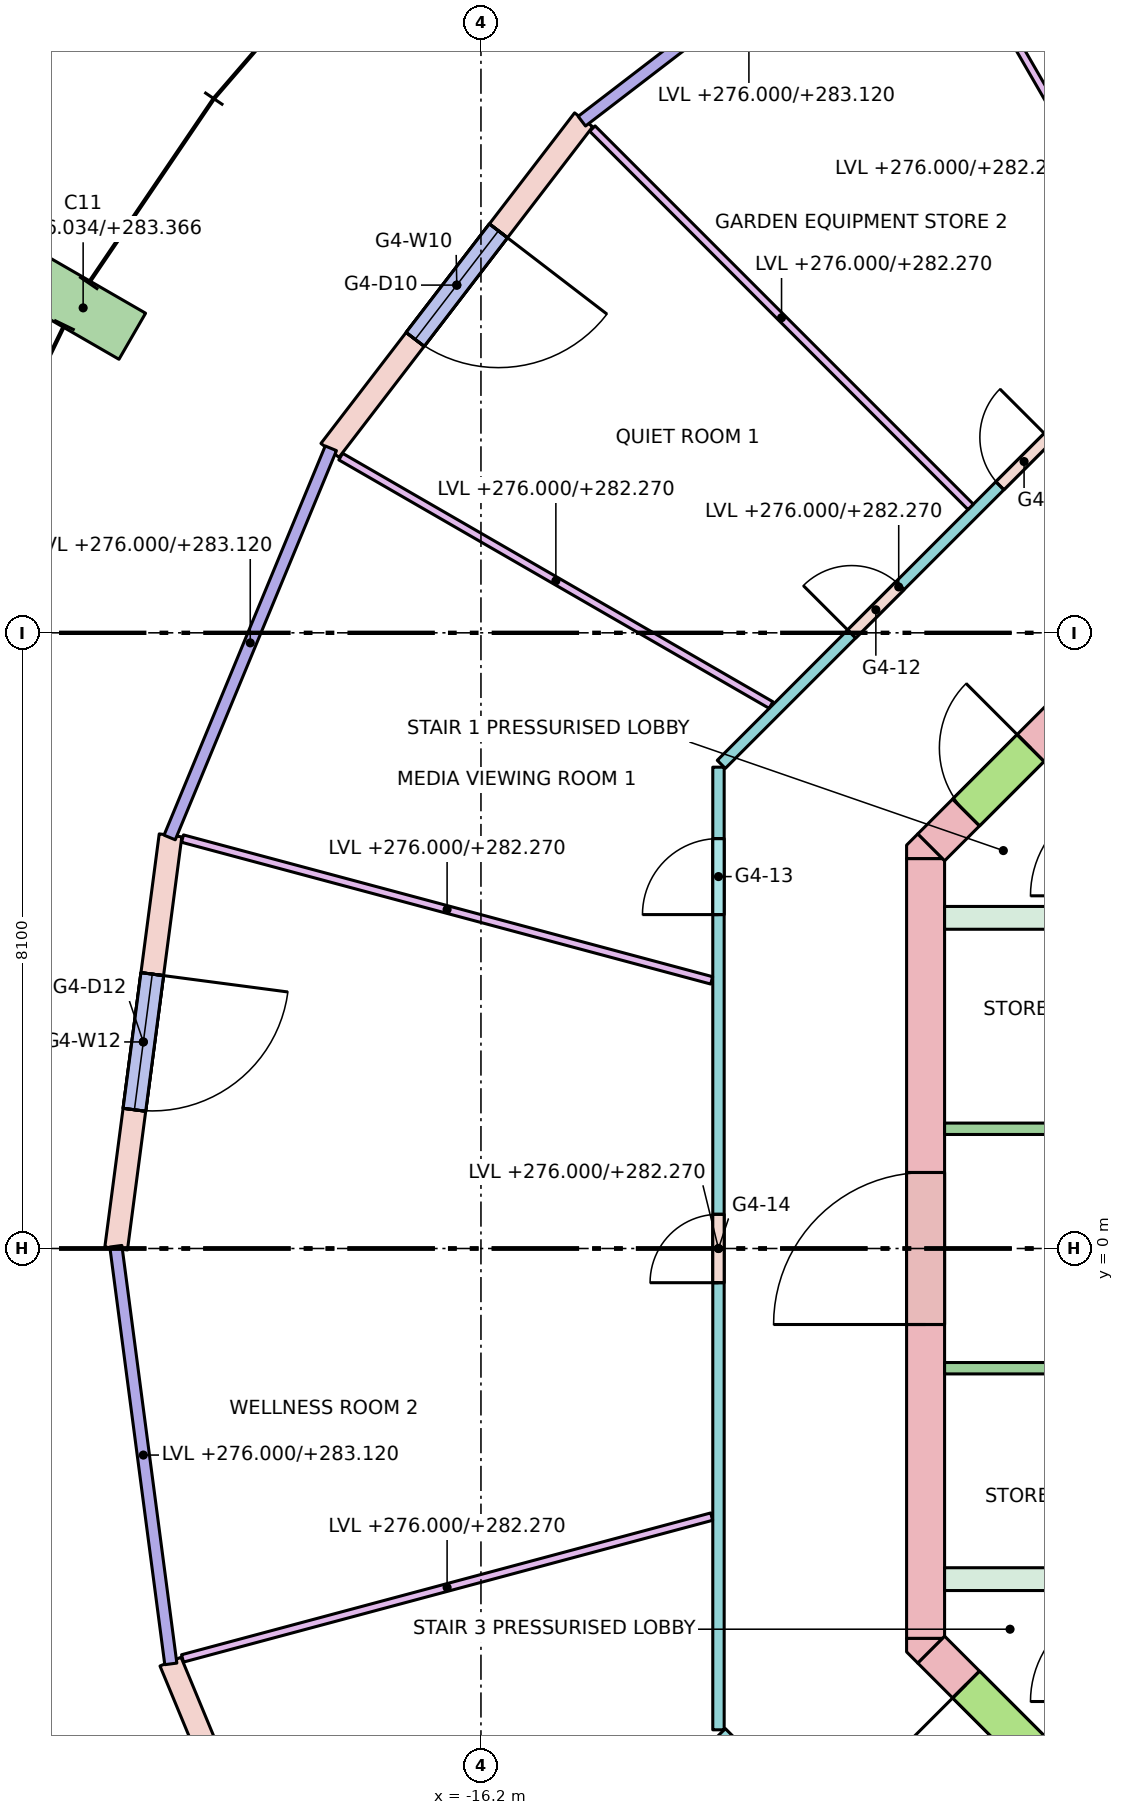
"""IFC4 building model, lengths in metres.
Left out: names, types, materials, properties, quantities, classifications, styles, units other than length and angle.
Written with IfcOpenShell. Run it as: python <this file> out.ifc"""

import sys

from ifc_helpers import new_model, si_unit, direction, frame, frame_2d, origin, origin_2d, place, context, subcontext, project, spatial, polyline, rectangle, outline, extrude, element, fill, save


model = new_model("IFC4")
c1 = context("Model", 3, precision=1e-05, world=origin(), true_north=direction((0.0, 1.0)))
c2 = subcontext(c1, "Body", "Model", "MODEL_VIEW")
j1 = project(units=[si_unit("LENGTHUNIT", "METRE"), si_unit("PLANEANGLEUNIT", "RADIAN")], contexts=[c1])
p1 = place(None, origin())
s1 = spatial("IfcSite", under=j1, at=p1, CompositionType="ELEMENT")
p2 = place(p1, origin())
s2 = spatial("IfcBuilding", under=s1, at=p2, CompositionType="ELEMENT")
p3 = place(p2, frame((0.0, 0.0, 276.0)))
s3 = spatial("IfcBuildingStorey", under=s2, at=p3, CompositionType="ELEMENT", Elevation=276.0)
p4 = place(p3, frame((-21.219, 12.251, 0.034), z_axis=(-0.058400484098, 0.033684920862, 0.997724766438), x_axis=(-0.4996371378, -0.866234801039, 0.0)))
e1 = element("IfcColumn", 1, at=p4, inside=s3, PredefinedType="COLUMN", context=c2, shape_type="SweptSolid", body=[
    extrude(rectangle(XDim=0.7, YDim=1.0, at=origin_2d()), origin(), (0.0, 0.0, 1.0), 7.349),
])
p5 = place(p3, frame((-10.35, -5.13, -0.28), z_axis=(0.0, 0.0, 1.0), x_axis=(0.0, 1.0, 0.0)))
e2 = element("IfcWall", 2, at=p5, inside=s3, PredefinedType="SHEAR", context=c2, shape_type="SweptSolid", body=[
    extrude(rectangle(XDim=10.26, YDim=0.5, at=frame_2d((5.13, 0.0))), origin(), (0.0, 0.0, 1.0), 7.4),
])
p6 = place(p5, frame((4.13, 0.0, 0.28)))
e3 = element("IfcOpeningElement", 3, at=p6, cuts=e2, PredefinedType="OPENING", context=c2, shape_type="SweptSolid", body=[
    extrude(rectangle(XDim=2.0, YDim=2.1, at=frame_2d((1.0, 1.05))), frame((0.0, 0.26, 0.0), z_axis=(0.0, -1.0, 0.0), x_axis=(1.0, 0.0, 0.0)), (0.0, 0.0, 1.0), 0.52),
])
p7 = place(p3, frame((-10.277, 5.277, -0.28), z_axis=(0.0, 0.0, 1.0), x_axis=(0.707106781187, 0.707106781187, 0.0)))
e4 = element("IfcWall", 4, at=p7, inside=s3, PredefinedType="SHEAR", context=c2, shape_type="SweptSolid", body=[
    extrude(rectangle(XDim=4.243, YDim=0.5, at=frame_2d((2.121, 0.0))), origin(), (0.0, 0.0, 1.0), 7.4),
])
p8 = place(p7, frame((0.65, 0.0, 0.28)))
e5 = element("IfcOpeningElement", 5, at=p8, cuts=e4, PredefinedType="OPENING", context=c2, shape_type="SweptSolid", body=[
    extrude(rectangle(XDim=1.2, YDim=2.1, at=frame_2d((0.6, 1.05))), frame((0.0, 0.26, 0.0), z_axis=(0.0, -1.0, 0.0), x_axis=(1.0, 0.0, 0.0)), (0.0, 0.0, 1.0), 0.52),
])
p9 = place(p3, frame((-7.277, -8.277, -0.28), z_axis=(0.0, 0.0, 1.0), x_axis=(-0.707106781187, 0.707106781187, 0.0)))
e6 = element("IfcWall", 6, at=p9, inside=s3, PredefinedType="SHEAR", context=c2, shape_type="SweptSolid", body=[
    extrude(rectangle(XDim=4.243, YDim=0.5, at=frame_2d((2.121, 0.0))), origin(), (0.0, 0.0, 1.0), 7.4),
])
p10 = place(p9, frame((2.393, 0.0, 0.28)))
e7 = element("IfcOpeningElement", 7, at=p10, cuts=e6, PredefinedType="OPENING", context=c2, shape_type="SweptSolid", body=[
    extrude(rectangle(XDim=1.2, YDim=2.1, at=frame_2d((0.6, 1.05))), frame((0.0, 0.26, 0.0), z_axis=(0.0, -1.0, 0.0), x_axis=(1.0, 0.0, 0.0)), (0.0, 0.0, 1.0), 0.52),
])
p11 = place(p3, frame((0.0, 0.0, -0.28)))
e8 = element("IfcWall", 8, at=p11, inside=s3, PredefinedType="SHEAR", context=c2, shape_type="SweptSolid", body=[
    extrude(outline(polyline([(-10.6, -5.307), (-10.6, -5.13), (-10.13, -5.13), (-10.454, -5.454), (-10.6, -5.307)])), origin(), (0.0, 0.0, 1.0), 7.4),
])
p12 = place(p3, frame((0.0, 0.0, -0.28)))
e9 = element("IfcWall", 9, at=p12, inside=s3, PredefinedType="SHEAR", context=c2, shape_type="SweptSolid", body=[
    extrude(outline(polyline([(-10.454, 5.454), (-10.13, 5.13), (-10.6, 5.13), (-10.6, 5.307), (-10.454, 5.454)])), origin(), (0.0, 0.0, 1.0), 7.4),
])
for number, where, z_axis, x_axis in (
    (10, (-10.1, 4.35, 0.0), (0.0, 0.0, 1.0), (1.0, 0.0, 0.0)),
    (11, (-10.1, -4.35, 0.0), (0.0, 0.0, 1.0), (1.0, 0.0, 0.0)),
):
    element("IfcWall", number, at=place(p3, frame(where, z_axis=z_axis, x_axis=x_axis)), inside=s3, PredefinedType="SOLIDWALL", context=c2, shape_type="SweptSolid", body=[
        extrude(rectangle(XDim=8.1, YDim=0.3, at=frame_2d((4.05, 0.0))), origin(), (0.0, 0.0, 1.0), 7.12),
    ])
p13 = place(p3, frame((-14.849, 14.849, 0.0), z_axis=(0.0, 0.0, 1.0), x_axis=(-0.608784891166, -0.793335336593, 0.0)))
e12 = element("IfcWall", 12, at=p13, inside=s3, PredefinedType="STANDARD", context=c2, shape_type="SweptSolid", body=[
    extrude(rectangle(XDim=5.482, YDim=0.3, at=frame_2d((2.741, 0.0))), origin(), (0.0, 0.0, 1.0), 7.12),
])
p14 = place(p13, frame((1.841, 0.0, 0.0)))
e13 = element("IfcOpeningElement", 13, at=p14, cuts=e12, PredefinedType="OPENING", context=c2, shape_type="SweptSolid", body=[
    extrude(rectangle(XDim=1.8, YDim=2.4, at=frame_2d((0.9, 1.2))), frame((0.0, 0.16, 0.0), z_axis=(0.0, -1.0, 0.0), x_axis=(1.0, 0.0, 0.0)), (0.0, 0.0, 1.0), 0.32),
])
p15 = place(p13, frame((1.841, 0.0, 2.8)))
e14 = element("IfcOpeningElement", 14, at=p15, cuts=e12, PredefinedType="OPENING", context=c2, shape_type="SweptSolid", body=[
    extrude(rectangle(XDim=1.8, YDim=4.1, at=frame_2d((0.9, 2.05))), frame((0.0, 0.16, 0.0), z_axis=(0.0, -1.0, 0.0), x_axis=(1.0, 0.0, 0.0)), (0.0, 0.0, 1.0), 0.32),
])
p16 = place(p3, frame((-20.284, 5.435, 0.0), z_axis=(0.0, 0.0, 1.0), x_axis=(-0.130527087244, -0.991444743541, 0.0)))
e15 = element("IfcWall", 15, at=p16, inside=s3, PredefinedType="STANDARD", context=c2, shape_type="SweptSolid", body=[
    extrude(rectangle(XDim=5.482, YDim=0.3, at=frame_2d((2.741, 0.0))), origin(), (0.0, 0.0, 1.0), 7.12),
])
p17 = place(p16, frame((1.841, 0.0, 0.0)))
e16 = element("IfcOpeningElement", 16, at=p17, cuts=e15, PredefinedType="OPENING", context=c2, shape_type="SweptSolid", body=[
    extrude(rectangle(XDim=1.8, YDim=2.4, at=frame_2d((0.9, 1.2))), frame((0.0, 0.16, 0.0), z_axis=(0.0, -1.0, 0.0), x_axis=(1.0, 0.0, 0.0)), (0.0, 0.0, 1.0), 0.32),
])
p18 = place(p16, frame((1.841, 0.0, 2.8)))
e17 = element("IfcOpeningElement", 17, at=p18, cuts=e15, PredefinedType="OPENING", context=c2, shape_type="SweptSolid", body=[
    extrude(rectangle(XDim=1.8, YDim=4.1, at=frame_2d((0.9, 2.05))), frame((0.0, 0.16, 0.0), z_axis=(0.0, -1.0, 0.0), x_axis=(1.0, 0.0, 0.0)), (0.0, 0.0, 1.0), 0.32),
])
p19 = place(p3, frame((-20.284, -5.435, 0.0), z_axis=(0.0, 0.0, 1.0), x_axis=(0.382688740813, -0.923877333662, 0.0)))
e18 = element("IfcWall", 18, at=p19, inside=s3, PredefinedType="STANDARD", context=c2, shape_type="SweptSolid", body=[
    extrude(rectangle(XDim=5.482, YDim=0.3, at=frame_2d((2.741, 0.0))), origin(), (0.0, 0.0, 1.0), 7.12),
])
p20 = place(p19, frame((1.841, 0.0, 0.0)))
e19 = element("IfcOpeningElement", 19, at=p20, cuts=e18, PredefinedType="OPENING", context=c2, shape_type="SweptSolid", body=[
    extrude(rectangle(XDim=1.8, YDim=2.4, at=frame_2d((0.9, 1.2))), frame((0.0, 0.16, 0.0), z_axis=(0.0, -1.0, 0.0), x_axis=(1.0, 0.0, 0.0)), (0.0, 0.0, 1.0), 0.32),
])
p21 = place(p19, frame((1.841, 0.0, 2.8)))
e20 = element("IfcOpeningElement", 20, at=p21, cuts=e18, PredefinedType="OPENING", context=c2, shape_type="SweptSolid", body=[
    extrude(rectangle(XDim=1.8, YDim=4.1, at=frame_2d((0.9, 2.05))), frame((0.0, 0.16, 0.0), z_axis=(0.0, -1.0, 0.0), x_axis=(1.0, 0.0, 0.0)), (0.0, 0.0, 1.0), 0.32),
])
p22 = place(p3, frame((-10.1, 1.575, 0.0), z_axis=(0.0, 0.0, 1.0), x_axis=(1.0, 0.0, 0.0)))
e21 = element("IfcWall", 21, at=p22, inside=s3, PredefinedType="PARTITIONING", context=c2, shape_type="SweptSolid", body=[
    extrude(rectangle(XDim=8.1, YDim=0.15, at=frame_2d((4.05, 0.0))), origin(), (0.0, 0.0, 1.0), 7.12),
])
p23 = place(p22, frame((2.333, 0.0, 0.0)))
e22 = element("IfcOpeningElement", 22, at=p23, cuts=e21, PredefinedType="OPENING", context=c2, shape_type="SweptSolid", body=[
    extrude(rectangle(XDim=0.9, YDim=2.1, at=frame_2d((0.45, 1.05))), frame((0.0, 0.085, 0.0), z_axis=(0.0, -1.0, 0.0), x_axis=(1.0, 0.0, 0.0)), (0.0, 0.0, 1.0), 0.17),
])
p24 = place(p22, frame((6.35, 0.0, 0.0)))
e23 = element("IfcOpeningElement", 23, at=p24, cuts=e21, PredefinedType="OPENING", context=c2, shape_type="SweptSolid", body=[
    extrude(rectangle(XDim=0.9, YDim=2.1, at=frame_2d((0.45, 1.05))), frame((0.0, 0.085, 0.0), z_axis=(0.0, -1.0, 0.0), x_axis=(1.0, 0.0, 0.0)), (0.0, 0.0, 1.0), 0.17),
])
p25 = place(p3, frame((-10.1, -1.575, 0.0), z_axis=(0.0, 0.0, 1.0), x_axis=(1.0, 0.0, 0.0)))
e24 = element("IfcWall", 24, at=p25, inside=s3, PredefinedType="PARTITIONING", context=c2, shape_type="SweptSolid", body=[
    extrude(rectangle(XDim=8.1, YDim=0.15, at=frame_2d((4.05, 0.0))), origin(), (0.0, 0.0, 1.0), 7.12),
])
p26 = place(p25, frame((1.538, 0.0, 0.0)))
e25 = element("IfcOpeningElement", 25, at=p26, cuts=e24, PredefinedType="OPENING", context=c2, shape_type="SweptSolid", body=[
    extrude(rectangle(XDim=0.9, YDim=2.1, at=frame_2d((0.45, 1.05))), frame((0.0, 0.085, 0.0), z_axis=(0.0, -1.0, 0.0), x_axis=(1.0, 0.0, 0.0)), (0.0, 0.0, 1.0), 0.17),
])
p27 = place(p25, frame((5.663, 0.0, 0.0)))
e26 = element("IfcOpeningElement", 26, at=p27, cuts=e24, PredefinedType="OPENING", context=c2, shape_type="SweptSolid", body=[
    extrude(rectangle(XDim=0.9, YDim=2.1, at=frame_2d((0.45, 1.05))), frame((0.0, 0.085, 0.0), z_axis=(0.0, -1.0, 0.0), x_axis=(1.0, 0.0, 0.0)), (0.0, 0.0, 1.0), 0.17),
])
p28 = place(p3, frame((-8.369, -11.038, 0.0), z_axis=(0.0, 0.0, 1.0), x_axis=(-0.707106781187, 0.707106781187, 0.0)))
e27 = element("IfcWall", 27, at=p28, inside=s3, PredefinedType="PARTITIONING", context=c2, shape_type="SweptSolid", body=[
    extrude(rectangle(XDim=6.602, YDim=0.15, at=frame_2d((3.301, 0.0))), origin(), (0.0, 0.0, 1.0), 6.27),
])
p29 = place(p28, frame((2.401, 0.0, 0.0)))
e28 = element("IfcOpeningElement", 28, at=p29, cuts=e27, PredefinedType="OPENING", context=c2, shape_type="SweptSolid", body=[
    extrude(rectangle(XDim=1.8, YDim=2.1, at=frame_2d((0.9, 1.05))), frame((0.0, 0.085, 0.0), z_axis=(0.0, -1.0, 0.0), x_axis=(1.0, 0.0, 0.0)), (0.0, 0.0, 1.0), 0.17),
])
p30 = place(p3, frame((-13.075, -6.332, 0.0), z_axis=(0.0, 0.0, 1.0), x_axis=(0.0, 1.0, 0.0)))
e29 = element("IfcWall", 29, at=p30, inside=s3, PredefinedType="PARTITIONING", context=c2, shape_type="SweptSolid", body=[
    extrude(rectangle(XDim=12.665, YDim=0.15, at=frame_2d((6.332, 0.0))), origin(), (0.0, 0.0, 1.0), 6.27),
])
p31 = place(p30, frame((10.725, 0.0, 0.0)))
e30 = element("IfcOpeningElement", 30, at=p31, cuts=e29, PredefinedType="OPENING", context=c2, shape_type="SweptSolid", body=[
    extrude(rectangle(XDim=1.0, YDim=2.1, at=frame_2d((0.5, 1.05))), frame((0.0, 0.085, 0.0), z_axis=(0.0, -1.0, 0.0), x_axis=(1.0, 0.0, 0.0)), (0.0, 0.0, 1.0), 0.17),
])
p32 = place(p30, frame((5.882, 0.0, 0.0)))
e31 = element("IfcOpeningElement", 31, at=p32, cuts=e29, PredefinedType="OPENING", context=c2, shape_type="SweptSolid", body=[
    extrude(rectangle(XDim=0.9, YDim=2.1, at=frame_2d((0.45, 1.05))), frame((0.0, 0.085, 0.0), z_axis=(0.0, -1.0, 0.0), x_axis=(1.0, 0.0, 0.0)), (0.0, 0.0, 1.0), 0.17),
])
p33 = place(p3, frame((-13.038, 6.369, 0.0), z_axis=(0.0, 0.0, 1.0), x_axis=(0.707106781187, 0.707106781187, 0.0)))
e32 = element("IfcWall", 32, at=p33, inside=s3, PredefinedType="PARTITIONING", context=c2, shape_type="SweptSolid", body=[
    extrude(rectangle(XDim=6.602, YDim=0.15, at=frame_2d((3.301, 0.0))), origin(), (0.0, 0.0, 1.0), 6.27),
])
p34 = place(p33, frame((5.184, 0.0, 0.0)))
e33 = element("IfcOpeningElement", 33, at=p34, cuts=e32, PredefinedType="OPENING", context=c2, shape_type="SweptSolid", body=[
    extrude(rectangle(XDim=0.9, YDim=2.1, at=frame_2d((0.45, 1.05))), frame((0.0, 0.085, 0.0), z_axis=(0.0, -1.0, 0.0), x_axis=(1.0, 0.0, 0.0)), (0.0, 0.0, 1.0), 0.17),
])
p35 = place(p33, frame((2.426, 0.0, 0.0)))
e34 = element("IfcOpeningElement", 34, at=p35, cuts=e32, PredefinedType="OPENING", context=c2, shape_type="SweptSolid", body=[
    extrude(rectangle(XDim=0.9, YDim=2.1, at=frame_2d((0.45, 1.05))), frame((0.0, 0.085, 0.0), z_axis=(0.0, -1.0, 0.0), x_axis=(1.0, 0.0, 0.0)), (0.0, 0.0, 1.0), 0.17),
])
p36 = place(p3, frame((-6.452, 11.175, 0.0), z_axis=(0.0, 0.0, 1.0), x_axis=(-0.50000481735, 0.866022622468, 0.0)))
e35 = element("IfcWall", 35, at=p36, inside=s3, PredefinedType="PARTITIONING", context=c2, shape_type="SweptSolid", body=[
    extrude(rectangle(XDim=7.934, YDim=0.1, at=frame_2d((3.967, 0.0))), origin(), (0.0, 0.0, 1.0), 6.27),
])
p37 = place(p3, frame((-9.757, 9.757, 0.0), z_axis=(0.0, 0.0, 1.0), x_axis=(-0.707106781187, 0.707106781187, 0.0)))
e36 = element("IfcWall", 36, at=p37, inside=s3, PredefinedType="PARTITIONING", context=c2, shape_type="SweptSolid", body=[
    extrude(rectangle(XDim=7.039, YDim=0.1, at=frame_2d((3.52, 0.0))), origin(), (0.0, 0.0, 1.0), 6.27),
])
p38 = place(p3, frame((-12.384, 7.15, 0.0), z_axis=(0.0, 0.0, 1.0), x_axis=(-0.866028240128, 0.499995087276, 0.0)))
e37 = element("IfcWall", 37, at=p38, inside=s3, PredefinedType="PARTITIONING", context=c2, shape_type="SweptSolid", body=[
    extrude(rectangle(XDim=6.537, YDim=0.1, at=frame_2d((3.269, 0.0))), origin(), (0.0, 0.0, 1.0), 6.27),
])
for number, where, z_axis, x_axis in (
    (38, (-13.164, 3.527, 0.0), (0.0, 0.0, 1.0), (-0.966, 0.259, 0.0)),
    (39, (-13.164, -3.527, 0.0), (0.0, 0.0, 1.0), (-0.966, -0.259, 0.0)),
):
    element("IfcWall", number, at=place(p3, frame(where, z_axis=z_axis, x_axis=x_axis)), inside=s3, PredefinedType="PARTITIONING", context=c2, shape_type="SweptSolid", body=[
        extrude(rectangle(XDim=7.208, YDim=0.1, at=frame_2d((3.604, 0.0))), origin(), (0.0, 0.0, 1.0), 6.27),
    ])
p39 = place(p14, origin())
e40 = element("IfcDoor", 40, at=p39, inside=s3, OperationType="SINGLE_SWING_LEFT", PredefinedType="DOOR", context=c2, shape_type="SweptSolid", body=[
    extrude(rectangle(XDim=1.8, YDim=2.4, at=frame_2d((0.9, 1.2))), frame((0.0, 0.025, 0.0), z_axis=(0.0, -1.0, 0.0), x_axis=(1.0, 0.0, 0.0)), (0.0, 0.0, 1.0), 0.05),
])
fill(e13, e40)
p40 = place(p15, origin())
e41 = element("IfcWindow", 41, at=p40, inside=s3, PartitioningType="SINGLE_PANEL", PredefinedType="WINDOW", context=c2, shape_type="SweptSolid", body=[
    extrude(rectangle(XDim=1.8, YDim=4.1, at=frame_2d((0.9, 2.05))), frame((0.0, 0.03, 0.0), z_axis=(0.0, -1.0, 0.0), x_axis=(1.0, 0.0, 0.0)), (0.0, 0.0, 1.0), 0.06),
])
fill(e14, e41)
p41 = place(p17, origin())
e42 = element("IfcDoor", 42, at=p41, inside=s3, OperationType="SINGLE_SWING_LEFT", PredefinedType="DOOR", context=c2, shape_type="SweptSolid", body=[
    extrude(rectangle(XDim=1.8, YDim=2.4, at=frame_2d((0.9, 1.2))), frame((0.0, 0.025, 0.0), z_axis=(0.0, -1.0, 0.0), x_axis=(1.0, 0.0, 0.0)), (0.0, 0.0, 1.0), 0.05),
])
fill(e16, e42)
p42 = place(p18, origin())
e43 = element("IfcWindow", 43, at=p42, inside=s3, PartitioningType="SINGLE_PANEL", PredefinedType="WINDOW", context=c2, shape_type="SweptSolid", body=[
    extrude(rectangle(XDim=1.8, YDim=4.1, at=frame_2d((0.9, 2.05))), frame((0.0, 0.03, 0.0), z_axis=(0.0, -1.0, 0.0), x_axis=(1.0, 0.0, 0.0)), (0.0, 0.0, 1.0), 0.06),
])
fill(e17, e43)
p43 = place(p8, origin())
e44 = element("IfcDoor", 44, at=p43, inside=s3, OperationType="SINGLE_SWING_RIGHT", PredefinedType="DOOR", context=c2, shape_type="SweptSolid", body=[
    extrude(rectangle(XDim=1.2, YDim=2.1, at=frame_2d((0.6, 1.05))), frame((0.0, 0.025, 0.0), z_axis=(0.0, -1.0, 0.0), x_axis=(1.0, 0.0, 0.0)), (0.0, 0.0, 1.0), 0.05),
])
fill(e5, e44)
p44 = place(p10, origin())
e45 = element("IfcDoor", 45, at=p44, inside=s3, OperationType="SINGLE_SWING_RIGHT", PredefinedType="DOOR", context=c2, shape_type="SweptSolid", body=[
    extrude(rectangle(XDim=1.2, YDim=2.1, at=frame_2d((0.6, 1.05))), frame((0.0, 0.025, 0.0), z_axis=(0.0, -1.0, 0.0), x_axis=(1.0, 0.0, 0.0)), (0.0, 0.0, 1.0), 0.05),
])
fill(e7, e45)
p45 = place(p6, origin())
e46 = element("IfcDoor", 46, at=p45, inside=s3, OperationType="DOUBLE_DOOR_SINGLE_SWING", PredefinedType="DOOR", context=c2, shape_type="SweptSolid", body=[
    extrude(rectangle(XDim=2.0, YDim=2.1, at=frame_2d((1.0, 1.05))), frame((0.0, 0.025, 0.0), z_axis=(0.0, -1.0, 0.0), x_axis=(1.0, 0.0, 0.0)), (0.0, 0.0, 1.0), 0.05),
])
fill(e3, e46)
p46 = place(p34, origin())
e47 = element("IfcDoor", 47, at=p46, inside=s3, OperationType="SINGLE_SWING_RIGHT", PredefinedType="DOOR", context=c2, shape_type="SweptSolid", body=[
    extrude(rectangle(XDim=0.9, YDim=2.1, at=frame_2d((0.45, 1.05))), frame((0.0, 0.025, 0.0), z_axis=(0.0, -1.0, 0.0), x_axis=(1.0, 0.0, 0.0)), (0.0, 0.0, 1.0), 0.05),
])
fill(e33, e47)
p47 = place(p35, origin())
e48 = element("IfcDoor", 48, at=p47, inside=s3, OperationType="SINGLE_SWING_LEFT", PredefinedType="DOOR", context=c2, shape_type="SweptSolid", body=[
    extrude(rectangle(XDim=0.9, YDim=2.1, at=frame_2d((0.45, 1.05))), frame((0.0, 0.025, 0.0), z_axis=(0.0, -1.0, 0.0), x_axis=(1.0, 0.0, 0.0)), (0.0, 0.0, 1.0), 0.05),
])
fill(e34, e48)
p48 = place(p31, origin())
e49 = element("IfcDoor", 49, at=p48, inside=s3, OperationType="SINGLE_SWING_LEFT", PredefinedType="DOOR", context=c2, shape_type="SweptSolid", body=[
    extrude(rectangle(XDim=1.0, YDim=2.1, at=frame_2d((0.5, 1.05))), frame((0.0, 0.025, 0.0), z_axis=(0.0, -1.0, 0.0), x_axis=(1.0, 0.0, 0.0)), (0.0, 0.0, 1.0), 0.05),
])
fill(e30, e49)
p49 = place(p32, origin())
e50 = element("IfcDoor", 50, at=p49, inside=s3, OperationType="SINGLE_SWING_LEFT", PredefinedType="DOOR", context=c2, shape_type="SweptSolid", body=[
    extrude(rectangle(XDim=0.9, YDim=2.1, at=frame_2d((0.45, 1.05))), frame((0.0, 0.025, 0.0), z_axis=(0.0, -1.0, 0.0), x_axis=(1.0, 0.0, 0.0)), (0.0, 0.0, 1.0), 0.05),
])
fill(e31, e50)
save(model, sys.argv[1])
